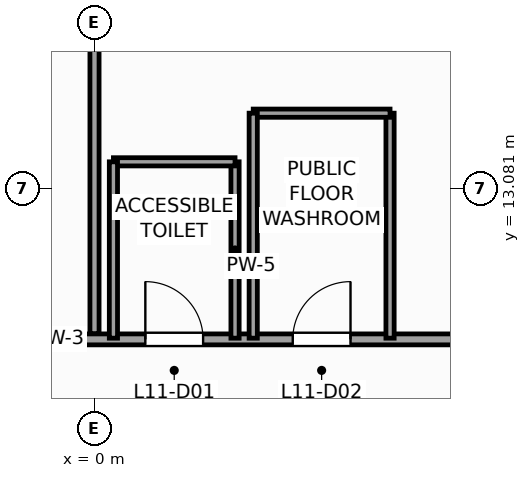
"""IFC4 building model, lengths in metres.
Left out: names, types, materials, properties, quantities, classifications, styles, units other than length and angle.
Written with IfcOpenShell. Run it as: python <this file> out.ifc"""

import sys

from ifc_helpers import new_model, si_unit, direction, frame, frame_2d, origin, place, context, subcontext, project, spatial, rectangle, extrude, source, transform, mapped, element, fill, save


model = new_model("IFC4")
c1 = context("Model", 3, precision=1e-05, world=origin(), true_north=direction((0.0, 1.0)))
c2 = subcontext(c1, "Body", "Model", "MODEL_VIEW")
j1 = project(units=[si_unit("LENGTHUNIT", "METRE"), si_unit("PLANEANGLEUNIT", "RADIAN")], contexts=[c1])
p1 = place(None, origin())
s1 = spatial("IfcSite", under=j1, at=p1, CompositionType="ELEMENT")
p2 = place(p1, origin())
s2 = spatial("IfcBuilding", under=s1, at=p2, CompositionType="ELEMENT")
p3 = place(p2, frame((0.0, 0.0, 50.0)))
s3 = spatial("IfcBuildingStorey", under=s2, at=p3, CompositionType="ELEMENT", Elevation=50.0)
p4 = place(p3, frame((-11.75, 10.6, 0.0), z_axis=(0.0, 0.0, 1.0), x_axis=(1.0, 0.0, 0.0)))
e1 = element("IfcWall", 1, at=p4, inside=s3, PredefinedType="PARTITIONING", context=c2, shape_type="SweptSolid", body=[
    extrude(rectangle(XDim=22.35, YDim=0.18, at=frame_2d((11.175, 0.0))), origin(), (0.0, 0.0, 1.0), 3.72),
])
p5 = place(p4, frame((12.586, 0.0, 0.0)))
e2 = element("IfcOpeningElement", 2, at=p5, cuts=e1, PredefinedType="OPENING", context=c2, shape_type="SweptSolid", body=[
    extrude(rectangle(XDim=0.95, YDim=2.1, at=frame_2d((0.475, 1.05))), frame((0.0, 0.1, 0.0), z_axis=(0.0, -1.0, 0.0), x_axis=(1.0, 0.0, 0.0)), (0.0, 0.0, 1.0), 0.2),
])
p6 = place(p4, frame((15.01, 0.0, 0.0)))
e3 = element("IfcOpeningElement", 3, at=p6, cuts=e1, PredefinedType="OPENING", context=c2, shape_type="SweptSolid", body=[
    extrude(rectangle(XDim=0.95, YDim=2.1, at=frame_2d((0.475, 1.05))), frame((0.0, 0.1, 0.0), z_axis=(0.0, -1.0, 0.0), x_axis=(1.0, 0.0, 0.0)), (0.0, 0.0, 1.0), 0.2),
])
p7 = place(p3, frame((0.0, 10.695, 0.0), z_axis=(0.0, 0.0, 1.0), x_axis=(0.0, 1.0, 0.0)))
e4 = element("IfcWall", 4, at=p7, inside=s3, PredefinedType="PARTITIONING", context=c2, shape_type="SweptSolid", body=[
    extrude(rectangle(XDim=17.99, YDim=0.15, at=frame_2d((8.995, 0.0))), origin(), (0.0, 0.0, 1.0), 3.72),
])
p8 = place(p3, frame((2.311, 10.62, 0.0), z_axis=(0.0, 0.0, 1.0), x_axis=(0.0, 1.0, 0.0)))
e5 = element("IfcWall", 5, at=p8, inside=s3, PredefinedType="PARTITIONING", context=c2, shape_type="SweptSolid", body=[
    extrude(rectangle(XDim=2.9, YDim=0.135, at=frame_2d((1.45, 0.0))), origin(), (0.0, 0.0, 1.0), 3.72),
])
p9 = place(p3, frame((0.311, 13.52, 0.0), z_axis=(0.0, 0.0, 1.0), x_axis=(1.0, 0.0, 0.0)))
e6 = element("IfcWall", 6, at=p9, inside=s3, PredefinedType="PARTITIONING", context=c2, shape_type="SweptSolid", body=[
    extrude(rectangle(XDim=2.0, YDim=0.135, at=frame_2d((1.0, 0.0))), origin(), (0.0, 0.0, 1.0), 3.72),
])
p10 = place(p3, frame((0.311, 10.62, 0.0), z_axis=(0.0, 0.0, 1.0), x_axis=(0.0, 1.0, 0.0)))
e7 = element("IfcWall", 7, at=p10, inside=s3, PredefinedType="PARTITIONING", context=c2, shape_type="SweptSolid", body=[
    extrude(rectangle(XDim=2.9, YDim=0.135, at=frame_2d((1.45, 0.0))), origin(), (0.0, 0.0, 1.0), 3.72),
])
p11 = place(p3, frame((4.86, 10.62, 0.0), z_axis=(0.0, 0.0, 1.0), x_axis=(0.0, 1.0, 0.0)))
e8 = element("IfcWall", 8, at=p11, inside=s3, PredefinedType="PARTITIONING", context=c2, shape_type="SweptSolid", body=[
    extrude(rectangle(XDim=3.7, YDim=0.135, at=frame_2d((1.85, 0.0))), origin(), (0.0, 0.0, 1.0), 3.72),
])
p12 = place(p3, frame((2.61, 14.32, 0.0), z_axis=(0.0, 0.0, 1.0), x_axis=(1.0, 0.0, 0.0)))
e9 = element("IfcWall", 9, at=p12, inside=s3, PredefinedType="PARTITIONING", context=c2, shape_type="SweptSolid", body=[
    extrude(rectangle(XDim=2.25, YDim=0.135, at=frame_2d((1.125, 0.0))), origin(), (0.0, 0.0, 1.0), 3.72),
])
p13 = place(p3, frame((2.61, 10.62, 0.0), z_axis=(0.0, 0.0, 1.0), x_axis=(0.0, 1.0, 0.0)))
e10 = element("IfcWall", 10, at=p13, inside=s3, PredefinedType="PARTITIONING", context=c2, shape_type="SweptSolid", body=[
    extrude(rectangle(XDim=3.7, YDim=0.135, at=frame_2d((1.85, 0.0))), origin(), (0.0, 0.0, 1.0), 3.72),
])
m1 = source(origin(), c2, "Body", "SweptSolid", [
    extrude(rectangle(XDim=0.95, YDim=2.1, at=frame_2d((0.475, 1.05))), frame((0.0, 0.025, 0.0), z_axis=(0.0, -1.0, 0.0), x_axis=(1.0, 0.0, 0.0)), (0.0, 0.0, 1.0), 0.05),
])
p14 = place(p5, origin())
e11 = element("IfcDoor", 11, at=p14, inside=s3, OperationType="SINGLE_SWING_LEFT", PredefinedType="DOOR", context=c2, shape_type="MappedRepresentation", body=[
    mapped(m1, transform((0.0, 0.0, 0.0), scale=1.0)),
])
fill(e2, e11)
p15 = place(p6, origin())
e12 = element("IfcDoor", 12, at=p15, inside=s3, OperationType="SINGLE_SWING_RIGHT", PredefinedType="DOOR", context=c2, shape_type="MappedRepresentation", body=[
    mapped(m1, transform((0.0, 0.0, 0.0), scale=1.0)),
])
fill(e3, e12)
save(model, sys.argv[1])
